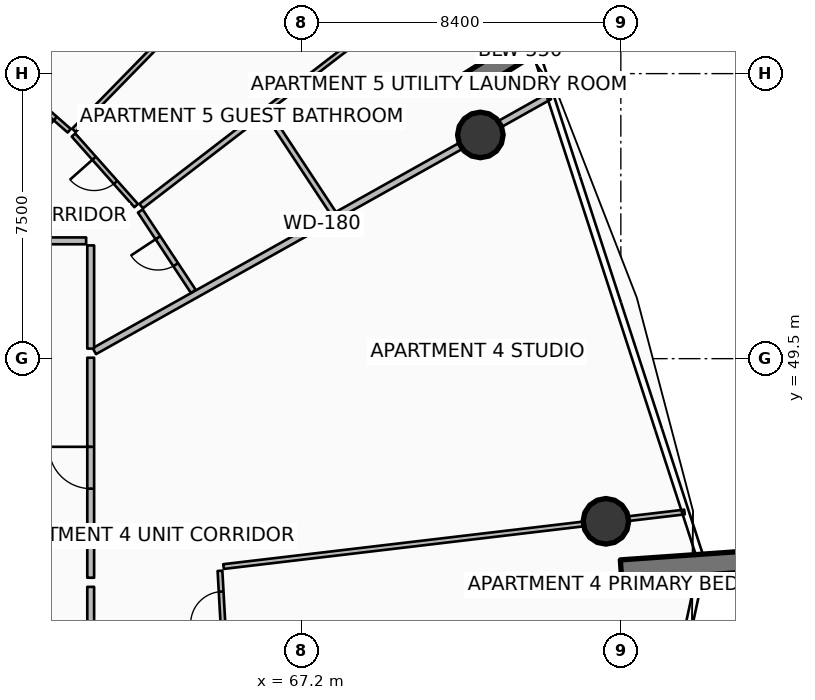
"""IFC4 building model, lengths in metres.
Left out: names, types, materials, properties, quantities, classifications, styles, units other than length and angle.
Written with IfcOpenShell. Run it as: python <this file> out.ifc"""

import sys

from ifc_helpers import new_model, si_unit, direction, frame, frame_2d, origin, origin_2d, place, context, subcontext, project, spatial, rectangle, circle, extrude, element, fill, save


model = new_model("IFC4")
c1 = context("Model", 3, precision=1e-05, world=origin(), true_north=direction((0.0, 1.0)))
c2 = subcontext(c1, "Body", "Model", "MODEL_VIEW")
j1 = project(units=[si_unit("LENGTHUNIT", "METRE"), si_unit("PLANEANGLEUNIT", "RADIAN")], contexts=[c1])
p1 = place(None, origin())
s1 = spatial("IfcSite", under=j1, at=p1, CompositionType="ELEMENT")
p2 = place(p1, origin())
s2 = spatial("IfcBuilding", under=s1, at=p2, CompositionType="ELEMENT")
p3 = place(p2, frame((0.0, 0.0, 86.4)))
s3 = spatial("IfcBuildingStorey", under=s2, at=p3, CompositionType="ELEMENT", Elevation=86.4)
for number, where, z_axis, x_axis in (
    (1, (71.469, 56.665, 0.0), (0.0, 0.0, 1.0), (0.848, 0.53, 0.0)),
    (2, (75.606, 43.93, 0.0), (0.0, 0.0, 1.0), (0.998, 0.07, 0.0)),
):
    element("IfcWall", number, at=place(p3, frame(where, z_axis=z_axis, x_axis=x_axis)), inside=s3, PredefinedType="SOLIDWALL", context=c2, shape_type="SweptSolid", body=[
        extrude(rectangle(XDim=3.5, YDim=0.55, at=frame_2d((1.75, 0.0))), origin(), (0.0, 0.0, 1.0), 3.75),
    ])
for number, where, z_axis, x_axis in (
    (3, (71.903, 55.386, 0.0), (0.0, 0.0, 1.0), (1.0, 0.0, 0.0)),
    (4, (75.207, 45.22, 0.0), (0.0, 0.0, 1.0), (1.0, 0.0, 0.0)),
):
    element("IfcColumn", number, at=place(p3, frame(where, z_axis=z_axis, x_axis=x_axis)), inside=s3, PredefinedType="COLUMN", context=c2, shape_type="SweptSolid", body=[
        extrude(circle(Radius=0.6, at=origin_2d()), origin(), (0.0, 0.0, 1.0), 3.5),
    ])
p4 = place(p3, frame((61.746, 49.698, 0.0), z_axis=(0.0, 0.0, 1.0), x_axis=(0.872489938668, 0.488632077256, 0.0)))
e5 = element("IfcWall", 5, at=p4, inside=s3, PredefinedType="PARTITIONING", context=c2, shape_type="SweptSolid", body=[
    extrude(rectangle(XDim=13.725, YDim=0.18, at=frame_2d((6.862, 0.0))), origin(), (0.0, 0.0, 1.0), 2.94),
])
p5 = place(p3, frame((61.65, 43.736, 0.0), z_axis=(0.0, 0.0, 1.0), x_axis=(0.0, 1.0, 0.0)))
e6 = element("IfcWall", 6, at=p5, inside=s3, PredefinedType="PARTITIONING", context=c2, shape_type="SweptSolid", body=[
    extrude(rectangle(XDim=5.789, YDim=0.18, at=frame_2d((2.895, 0.0))), origin(), (0.0, 0.0, 1.0), 2.94),
])
p6 = place(p5, frame((2.344, 0.0, 0.0)))
e7 = element("IfcOpeningElement", 7, at=p6, cuts=e6, PredefinedType="OPENING", context=c2, shape_type="SweptSolid", body=[
    extrude(rectangle(XDim=1.1, YDim=2.1, at=frame_2d((0.55, 1.05))), frame((0.0, 0.1, 0.0), z_axis=(0.0, -1.0, 0.0), x_axis=(1.0, 0.0, 0.0)), (0.0, 0.0, 1.0), 0.2),
])
p7 = place(p3, frame((61.65, 38.27, 0.0), z_axis=(0.0, 0.0, 1.0), x_axis=(0.0, 1.0, 0.0)))
e8 = element("IfcWall", 8, at=p7, inside=s3, PredefinedType="PARTITIONING", context=c2, shape_type="SweptSolid", body=[
    extrude(rectangle(XDim=5.225, YDim=0.18, at=frame_2d((2.613, 0.0))), origin(), (0.0, 0.0, 1.0), 2.94),
])
p8 = place(p3, frame((65.145, 44.029, 0.0), z_axis=(0.0, 0.0, 1.0), x_axis=(0.993069321468, 0.117530092994, 0.0)))
e9 = element("IfcWall", 9, at=p8, inside=s3, PredefinedType="PARTITIONING", context=c2, shape_type="SweptSolid", body=[
    extrude(rectangle(XDim=12.214, YDim=0.125, at=frame_2d((6.107, 0.0))), origin(), (0.0, 0.0, 1.0), 2.94),
])
p9 = place(p3, frame((65.16, 41.975, 0.0), z_axis=(0.0, 0.0, 1.0), x_axis=(-0.055845342743, 0.998439431159, 0.0)))
e10 = element("IfcWall", 10, at=p9, inside=s3, PredefinedType="PARTITIONING", context=c2, shape_type="SweptSolid", body=[
    extrude(rectangle(XDim=1.945, YDim=0.125, at=frame_2d((0.973, 0.0))), origin(), (0.0, 0.0, 1.0), 2.94),
])
p10 = place(p9, frame((0.548, 0.0, 0.0)))
e11 = element("IfcOpeningElement", 11, at=p10, cuts=e10, PredefinedType="OPENING", context=c2, shape_type="SweptSolid", body=[
    extrude(rectangle(XDim=0.85, YDim=2.06, at=frame_2d((0.425, 1.03))), frame((0.0, 0.073, 0.0), z_axis=(0.0, -1.0, 0.0), x_axis=(1.0, 0.0, 0.0)), (0.0, 0.0, 1.0), 0.145),
])
p11 = place(p3, frame((61.65, 49.764, 0.0), z_axis=(0.0, 0.0, 1.0), x_axis=(0.0, 1.0, 0.0)))
e12 = element("IfcWall", 12, at=p11, inside=s3, PredefinedType="PARTITIONING", context=c2, shape_type="SweptSolid", body=[
    extrude(rectangle(XDim=2.716, YDim=0.18, at=frame_2d((1.358, 0.0))), origin(), (0.0, 0.0, 1.0), 2.94),
])
p12 = place(p3, frame((61.53, 52.6, 0.0), z_axis=(0.0, 0.0, 1.0), x_axis=(-1.0, 0.0, 0.0)))
e13 = element("IfcWall", 13, at=p12, inside=s3, PredefinedType="PARTITIONING", context=c2, shape_type="SweptSolid", body=[
    extrude(rectangle(XDim=5.054, YDim=0.18, at=frame_2d((2.527, 0.0))), origin(), (0.0, 0.0, 1.0), 2.94),
])
p13 = place(p3, frame((59.702, 56.844, 0.0), z_axis=(0.0, 0.0, 1.0), x_axis=(0.619083405129, 0.785325243128, 0.0)))
e14 = element("IfcWall", 14, at=p13, inside=s3, PredefinedType="PARTITIONING", context=c2, shape_type="SweptSolid", body=[
    extrude(rectangle(XDim=9.769, YDim=0.125, at=frame_2d((4.885, 0.0))), origin(), (0.0, 0.0, 1.0), 2.94),
])
p14 = place(p3, frame((64.35, 51.271, 0.0), z_axis=(0.0, 0.0, 1.0), x_axis=(-0.550510405652, 0.83482830167, 0.0)))
e15 = element("IfcWall", 15, at=p14, inside=s3, PredefinedType="PARTITIONING", context=c2, shape_type="SweptSolid", body=[
    extrude(rectangle(XDim=2.532, YDim=0.15, at=frame_2d((1.266, 0.0))), origin(), (0.0, 0.0, 1.0), 2.94),
])
p15 = place(p14, frame((0.841, 0.0, 0.0)))
e16 = element("IfcOpeningElement", 16, at=p15, cuts=e15, PredefinedType="OPENING", context=c2, shape_type="SweptSolid", body=[
    extrude(rectangle(XDim=0.85, YDim=2.06, at=frame_2d((0.425, 1.03))), frame((0.0, 0.085, 0.0), z_axis=(0.0, -1.0, 0.0), x_axis=(1.0, 0.0, 0.0)), (0.0, 0.0, 1.0), 0.17),
])
p16 = place(p3, frame((68.031, 53.333, 0.0), z_axis=(0.0, 0.0, 1.0), x_axis=(-0.550480727927, 0.83484787128, 0.0)))
e17 = element("IfcWall", 17, at=p16, inside=s3, PredefinedType="PARTITIONING", context=c2, shape_type="SweptSolid", body=[
    extrude(rectangle(XDim=3.143, YDim=0.15, at=frame_2d((1.572, 0.0))), origin(), (0.0, 0.0, 1.0), 2.94),
])
p17 = place(p3, frame((62.978, 53.514, 0.0), z_axis=(0.0, 0.0, 1.0), x_axis=(0.792801485355, 0.609479946199, 0.0)))
e18 = element("IfcWall", 18, at=p17, inside=s3, PredefinedType="PARTITIONING", context=c2, shape_type="SweptSolid", body=[
    extrude(rectangle(XDim=4.09, YDim=0.15, at=frame_2d((2.045, 0.0))), origin(), (0.0, 0.0, 1.0), 2.94),
])
p18 = place(p3, frame((66.323, 56.086, 0.0), z_axis=(0.0, 0.0, 1.0), x_axis=(0.792792040596, 0.60949223159, 0.0)))
e19 = element("IfcWall", 19, at=p18, inside=s3, PredefinedType="PARTITIONING", context=c2, shape_type="SweptSolid", body=[
    extrude(rectangle(XDim=5.994, YDim=0.125, at=frame_2d((2.997, 0.0))), origin(), (0.0, 0.0, 1.0), 2.94),
])
p19 = place(p18, frame((2.572, 0.0, 0.0)))
e20 = element("IfcOpeningElement", 20, at=p19, cuts=e19, PredefinedType="OPENING", context=c2, shape_type="SweptSolid", body=[
    extrude(rectangle(XDim=0.85, YDim=2.06, at=frame_2d((0.425, 1.03))), frame((0.0, 0.073, 0.0), z_axis=(0.0, -1.0, 0.0), x_axis=(1.0, 0.0, 0.0)), (0.0, 0.0, 1.0), 0.145),
])
p20 = place(p3, frame((61.208, 55.508, 0.0), z_axis=(0.0, 0.0, 1.0), x_axis=(0.699096858951, 0.715026979774, 0.0)))
e21 = element("IfcWall", 21, at=p20, inside=s3, PredefinedType="PARTITIONING", context=c2, shape_type="SweptSolid", body=[
    extrude(rectangle(XDim=9.747, YDim=0.125, at=frame_2d((4.874, 0.0))), origin(), (0.0, 0.0, 1.0), 2.94),
])
p21 = place(p3, frame((62.846, 53.527, 0.0), z_axis=(0.0, 0.0, 1.0), x_axis=(-0.663881646848, 0.747837655497, 0.0)))
e22 = element("IfcWall", 22, at=p21, inside=s3, PredefinedType="PARTITIONING", context=c2, shape_type="SweptSolid", body=[
    extrude(rectangle(XDim=2.483, YDim=0.125, at=frame_2d((1.242, 0.0))), origin(), (0.0, 0.0, 1.0), 2.94),
])
p22 = place(p21, frame((0.817, 0.0, 0.0)))
e23 = element("IfcOpeningElement", 23, at=p22, cuts=e22, PredefinedType="OPENING", context=c2, shape_type="SweptSolid", body=[
    extrude(rectangle(XDim=0.85, YDim=2.06, at=frame_2d((0.425, 1.03))), frame((0.0, 0.073, 0.0), z_axis=(0.0, -1.0, 0.0), x_axis=(1.0, 0.0, 0.0)), (0.0, 0.0, 1.0), 0.145),
])
p23 = place(p3, frame((61.084, 55.497, 0.0), z_axis=(0.0, 0.0, 1.0), x_axis=(-0.75124742024, 0.660020691784, 0.0)))
e24 = element("IfcWall", 24, at=p23, inside=s3, PredefinedType="PARTITIONING", context=c2, shape_type="SweptSolid", body=[
    extrude(rectangle(XDim=1.823, YDim=0.125, at=frame_2d((0.911, 0.0))), origin(), (0.0, 0.0, 1.0), 2.94),
])
p24 = place(p23, frame((0.486, 0.0, 0.0)))
e25 = element("IfcOpeningElement", 25, at=p24, cuts=e24, PredefinedType="OPENING", context=c2, shape_type="SweptSolid", body=[
    extrude(rectangle(XDim=0.85, YDim=2.06, at=frame_2d((0.425, 1.03))), frame((0.0, 0.073, 0.0), z_axis=(0.0, -1.0, 0.0), x_axis=(1.0, 0.0, 0.0)), (0.0, 0.0, 1.0), 0.145),
])
p25 = place(p6, origin())
e26 = element("IfcDoor", 26, at=p25, inside=s3, OperationType="SINGLE_SWING_RIGHT", PredefinedType="DOOR", context=c2, shape_type="SweptSolid", body=[
    extrude(rectangle(XDim=1.1, YDim=2.1, at=frame_2d((0.55, 1.05))), frame((0.0, 0.025, 0.0), z_axis=(0.0, -1.0, 0.0), x_axis=(1.0, 0.0, 0.0)), (0.0, 0.0, 1.0), 0.05),
])
fill(e7, e26)
p26 = place(p10, origin())
e27 = element("IfcDoor", 27, at=p26, inside=s3, OperationType="SINGLE_SWING_LEFT", PredefinedType="DOOR", context=c2, shape_type="SweptSolid", body=[
    extrude(rectangle(XDim=0.85, YDim=2.06, at=frame_2d((0.425, 1.03))), frame((0.0, 0.025, 0.0), z_axis=(0.0, -1.0, 0.0), x_axis=(1.0, 0.0, 0.0)), (0.0, 0.0, 1.0), 0.05),
])
fill(e11, e27)
p27 = place(p15, origin())
e28 = element("IfcDoor", 28, at=p27, inside=s3, OperationType="SINGLE_SWING_RIGHT", PredefinedType="DOOR", context=c2, shape_type="SweptSolid", body=[
    extrude(rectangle(XDim=0.85, YDim=2.06, at=frame_2d((0.425, 1.03))), frame((0.0, 0.025, 0.0), z_axis=(0.0, -1.0, 0.0), x_axis=(1.0, 0.0, 0.0)), (0.0, 0.0, 1.0), 0.05),
])
fill(e16, e28)
p28 = place(p22, origin())
e29 = element("IfcDoor", 29, at=p28, inside=s3, OperationType="SINGLE_SWING_RIGHT", PredefinedType="DOOR", context=c2, shape_type="SweptSolid", body=[
    extrude(rectangle(XDim=0.85, YDim=2.06, at=frame_2d((0.425, 1.03))), frame((0.0, 0.025, 0.0), z_axis=(0.0, -1.0, 0.0), x_axis=(1.0, 0.0, 0.0)), (0.0, 0.0, 1.0), 0.05),
])
fill(e23, e29)
p29 = place(p24, origin())
e30 = element("IfcDoor", 30, at=p29, inside=s3, OperationType="SINGLE_SWING_LEFT", PredefinedType="DOOR", context=c2, shape_type="SweptSolid", body=[
    extrude(rectangle(XDim=0.85, YDim=2.06, at=frame_2d((0.425, 1.03))), frame((0.0, 0.025, 0.0), z_axis=(0.0, -1.0, 0.0), x_axis=(1.0, 0.0, 0.0)), (0.0, 0.0, 1.0), 0.05),
])
fill(e25, e30)
save(model, sys.argv[1])
